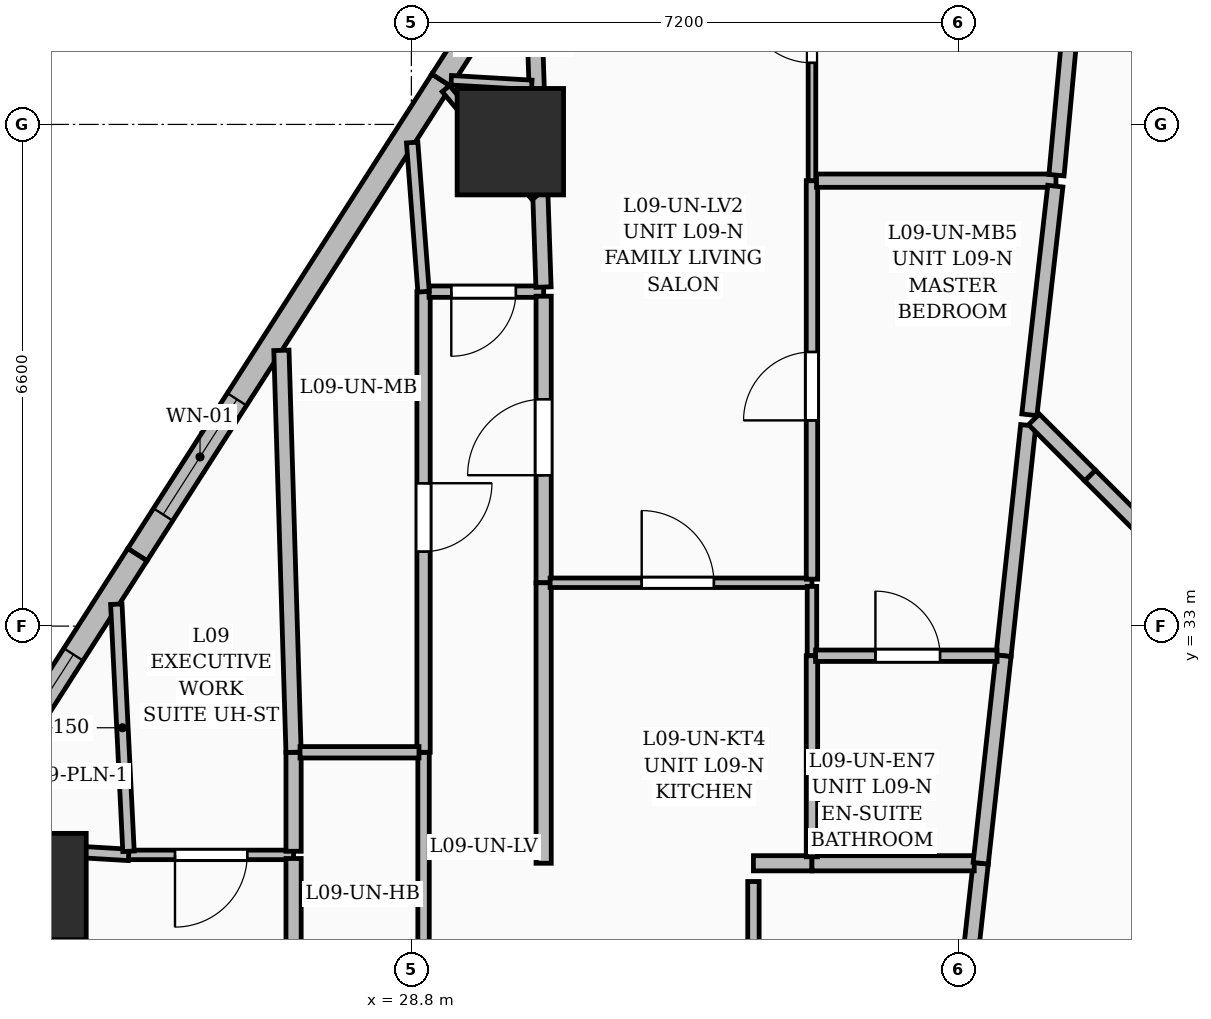
"""IFC4 building model, lengths in metres.
Left out: names, types, materials, properties, quantities, classifications, styles, units other than length and angle.
Written with IfcOpenShell. Run it as: python <this file> out.ifc"""

import sys

from ifc_helpers import new_model, si_unit, direction, frame, frame_2d, origin, origin_2d, place, context, subcontext, project, spatial, rectangle, extrude, element, fill, save


model = new_model("IFC4")
c1 = context("Model", 3, precision=1e-05, world=origin(), true_north=direction((0.0, 1.0)))
c2 = subcontext(c1, "Body", "Model", "MODEL_VIEW")
j1 = project(units=[si_unit("LENGTHUNIT", "METRE"), si_unit("PLANEANGLEUNIT", "RADIAN")], contexts=[c1])
p1 = place(None, origin())
s1 = spatial("IfcSite", under=j1, at=p1, CompositionType="ELEMENT")
p2 = place(p1, origin())
s2 = spatial("IfcBuilding", under=s1, at=p2, CompositionType="ELEMENT")
p3 = place(p2, frame((0.0, 0.0, 42.6)))
s3 = spatial("IfcBuildingStorey", under=s2, at=p3, CompositionType="ELEMENT", Elevation=42.6)
for number, where, z_axis, x_axis in (
    (1, (30.102, 39.373, 0.0), (0.0, 0.0, 1.0), (1.0, 0.0, 0.0)),
    (2, (23.822, 29.573, 0.0), (0.0, 0.0, 1.0), (1.0, 0.0, 0.0)),
):
    element("IfcColumn", number, at=place(p3, frame(where, z_axis=z_axis, x_axis=x_axis)), inside=s3, PredefinedType="COLUMN", context=c2, shape_type="SweptSolid", body=[
        extrude(rectangle(XDim=1.4, YDim=1.4, at=origin_2d()), origin(), (0.0, 0.0, 1.0), 3.6),
    ])
p4 = place(p3, frame((21.198, 27.701, 0.0), z_axis=(0.0, 0.0, 1.0), x_axis=(0.539535005594, 0.841963168873, 0.0)))
e3 = element("IfcWall", 3, at=p4, inside=s3, PredefinedType="SOLIDWALL", context=c2, shape_type="SweptSolid", body=[
    extrude(rectangle(XDim=7.412, YDim=0.3, at=frame_2d((3.706, 0.0))), origin(), (0.0, 0.0, 1.0), 3.35),
])
p5 = place(p4, frame((0.675, 0.0, 0.8)))
e4 = element("IfcOpeningElement", 4, at=p5, cuts=e3, PredefinedType="OPENING", context=c2, shape_type="SweptSolid", body=[
    extrude(rectangle(XDim=1.2, YDim=1.8, at=frame_2d((0.6, 0.9))), frame((0.0, 0.16, 0.0), z_axis=(0.0, -1.0, 0.0), x_axis=(1.0, 0.0, 0.0)), (0.0, 0.0, 1.0), 0.32),
])
p6 = place(p4, frame((3.45, 0.0, 0.6)))
e5 = element("IfcOpeningElement", 5, at=p6, cuts=e3, PredefinedType="OPENING", context=c2, shape_type="SweptSolid", body=[
    extrude(rectangle(XDim=2.4, YDim=2.1, at=frame_2d((1.2, 1.05))), frame((0.0, 0.16, 0.0), z_axis=(0.0, -1.0, 0.0), x_axis=(1.0, 0.0, 0.0)), (0.0, 0.0, 1.0), 0.32),
])
p7 = place(p3, frame((25.197, 33.941, 0.0), z_axis=(0.0, 0.0, 1.0), x_axis=(0.539535005594, 0.841963168873, 0.0)))
e6 = element("IfcWall", 6, at=p7, inside=s3, PredefinedType="SOLIDWALL", context=c2, shape_type="SweptSolid", body=[
    extrude(rectangle(XDim=7.412, YDim=0.3, at=frame_2d((3.706, 0.0))), origin(), (0.0, 0.0, 1.0), 3.35),
])
p8 = place(p7, frame((0.625, 0.0, 0.6)))
e7 = element("IfcOpeningElement", 7, at=p8, cuts=e6, PredefinedType="OPENING", context=c2, shape_type="SweptSolid", body=[
    extrude(rectangle(XDim=1.8, YDim=2.1, at=frame_2d((0.9, 1.05))), frame((0.0, 0.16, 0.0), z_axis=(0.0, -1.0, 0.0), x_axis=(1.0, 0.0, 0.0)), (0.0, 0.0, 1.0), 0.32),
])
p9 = place(p3, frame((29.195, 40.182, 0.0), z_axis=(0.0, 0.0, 1.0), x_axis=(0.539520042018, 0.841972757434, 0.0)))
e8 = element("IfcWall", 8, at=p9, inside=s3, PredefinedType="SOLIDWALL", context=c2, shape_type="SweptSolid", body=[
    extrude(rectangle(XDim=7.412, YDim=0.3, at=frame_2d((3.706, 0.0))), origin(), (0.0, 0.0, 1.0), 3.35),
])
p10 = place(p9, frame((3.875, 0.0, 0.6)))
e9 = element("IfcOpeningElement", 9, at=p10, cuts=e8, PredefinedType="OPENING", context=c2, shape_type="SweptSolid", body=[
    extrude(rectangle(XDim=1.8, YDim=2.1, at=frame_2d((0.9, 1.05))), frame((0.0, 0.16, 0.0), z_axis=(0.0, -1.0, 0.0), x_axis=(1.0, 0.0, 0.0)), (0.0, 0.0, 1.0), 0.32),
])
p11 = place(p3, frame((24.319, 17.834, 0.0), z_axis=(0.0, 0.0, 1.0), x_axis=(-0.131322881858, 0.991339649515, 0.0)))
e10 = element("IfcWall", 10, at=p11, inside=s3, PredefinedType="PARTITIONING", context=c2, shape_type="SweptSolid", body=[
    extrude(rectangle(XDim=12.116, YDim=0.2, at=frame_2d((6.058, 0.0))), origin(), (0.0, 0.0, 1.0), 2.37),
])
p12 = place(p3, frame((27.25, 29.99, 0.0), z_axis=(0.0, 0.0, 1.0), x_axis=(-1.0, 0.0, 0.0)))
e11 = element("IfcWall", 11, at=p12, inside=s3, PredefinedType="PARTITIONING", context=c2, shape_type="SweptSolid", body=[
    extrude(rectangle(XDim=2.17, YDim=0.125, at=frame_2d((1.085, 0.0))), origin(), (0.0, 0.0, 1.0), 3.35),
])
p13 = place(p12, frame((0.61, 0.0, 0.0)))
e12 = element("IfcOpeningElement", 12, at=p13, cuts=e11, PredefinedType="OPENING", context=c2, shape_type="SweptSolid", body=[
    extrude(rectangle(XDim=0.95, YDim=2.2, at=frame_2d((0.475, 1.1))), frame((0.0, 0.072, 0.0), z_axis=(0.0, -1.0, 0.0), x_axis=(1.0, 0.0, 0.0)), (0.0, 0.0, 1.0), 0.145),
])
p14 = place(p3, frame((25.08, 29.99, 0.0), z_axis=(0.0, 0.0, 1.0), x_axis=(-0.998242794365, 0.059256421583, 0.0)))
e13 = element("IfcWall", 13, at=p14, inside=s3, PredefinedType="PARTITIONING", context=c2, shape_type="SweptSolid", body=[
    extrude(rectangle(XDim=2.196, YDim=0.15, at=frame_2d((1.098, 0.0))), origin(), (0.0, 0.0, 1.0), 2.37),
])
p15 = place(p3, frame((27.25, 24.55, 0.0), z_axis=(0.0, 0.0, 1.0), x_axis=(0.0, 1.0, 0.0)))
e14 = element("IfcWall", 14, at=p15, inside=s3, PredefinedType="PARTITIONING", context=c2, shape_type="SweptSolid", body=[
    extrude(rectangle(XDim=5.392, YDim=0.2, at=frame_2d((2.696, 0.0))), origin(), (0.0, 0.0, 1.0), 2.279),
])
p16 = place(p3, frame((24.918, 33.288, 0.0), z_axis=(0.0, 0.0, 1.0), x_axis=(0.04928658055, -0.998784677985, 0.0)))
e15 = element("IfcWall", 15, at=p16, inside=s3, PredefinedType="PARTITIONING", context=c2, shape_type="SweptSolid", body=[
    extrude(rectangle(XDim=3.254, YDim=0.15, at=frame_2d((1.627, 0.0))), origin(), (0.0, 0.0, 1.0), 2.37),
])
p17 = place(p3, frame((27.25, 30.038, 0.0), z_axis=(0.0, 0.0, 1.0), x_axis=(0.0, 1.0, 0.0)))
e16 = element("IfcWall", 16, at=p17, inside=s3, PredefinedType="PARTITIONING", context=c2, shape_type="SweptSolid", body=[
    extrude(rectangle(XDim=1.302, YDim=0.2, at=frame_2d((0.651, 0.0))), origin(), (0.0, 0.0, 1.0), 3.35),
])
p18 = place(p3, frame((27.25, 31.34, 0.0), z_axis=(0.0, 0.0, 1.0), x_axis=(-0.030227650921, 0.999543040154, 0.0)))
e17 = element("IfcWall", 17, at=p18, inside=s3, PredefinedType="PARTITIONING", context=c2, shape_type="SweptSolid", body=[
    extrude(rectangle(XDim=5.29, YDim=0.2, at=frame_2d((2.645, 0.0))), origin(), (0.0, 0.0, 1.0), 2.37),
])
p19 = place(p3, frame((34.959, 17.834, 0.0), z_axis=(0.0, 0.0, 1.0), x_axis=(0.109814601961, 0.993952087978, 0.0)))
e18 = element("IfcWall", 18, at=p19, inside=s3, PredefinedType="PARTITIONING", context=c2, shape_type="SweptSolid", body=[
    extrude(rectangle(XDim=12.119, YDim=0.2, at=frame_2d((6.059, 0.0))), origin(), (0.0, 0.0, 1.0), 2.279),
])
p20 = place(p3, frame((34.07, 29.88, 0.0), z_axis=(0.0, 0.0, 1.0), x_axis=(-1.0, 0.0, 0.0)))
e19 = element("IfcWall", 19, at=p20, inside=s3, PredefinedType="PARTITIONING", context=c2, shape_type="SweptSolid", body=[
    extrude(rectangle(XDim=0.77, YDim=0.2, at=frame_2d((0.385, 0.0))), origin(), (0.0, 0.0, 1.0), 3.35),
])
p21 = place(p3, frame((36.205, 29.88, 0.0), z_axis=(0.0, 0.0, 1.0), x_axis=(-1.0, 0.0, 0.0)))
e20 = element("IfcWall", 20, at=p21, inside=s3, PredefinedType="PARTITIONING", context=c2, shape_type="SweptSolid", body=[
    extrude(rectangle(XDim=2.135, YDim=0.2, at=frame_2d((1.067, 0.0))), origin(), (0.0, 0.0, 1.0), 2.279),
])
p22 = place(p3, frame((36.915, 35.641, 0.0), z_axis=(0.0, 0.0, 1.0), x_axis=(-0.106606653323, -0.994301272989, 0.0)))
e21 = element("IfcWall", 21, at=p22, inside=s3, PredefinedType="PARTITIONING", context=c2, shape_type="SweptSolid", body=[
    extrude(rectangle(XDim=3.048, YDim=0.2, at=frame_2d((1.524, 0.0))), origin(), (0.0, 0.0, 1.0), 2.787),
])
p23 = place(p3, frame((36.59, 32.61, 0.0), z_axis=(0.0, 0.0, 1.0), x_axis=(-0.109241237924, -0.994015267457, 0.0)))
e22 = element("IfcWall", 22, at=p23, inside=s3, PredefinedType="PARTITIONING", context=c2, shape_type="SweptSolid", body=[
    extrude(rectangle(XDim=2.747, YDim=0.2, at=frame_2d((1.373, 0.0))), origin(), (0.0, 0.0, 1.0), 2.787),
])
p24 = place(p3, frame((37.73, 34.98, 0.0), z_axis=(0.0, 0.0, 1.0), x_axis=(-0.707106781187, 0.707106781187, 0.0)))
e23 = element("IfcWall", 23, at=p24, inside=s3, PredefinedType="PARTITIONING", context=c2, shape_type="SweptSolid", body=[
    extrude(rectangle(XDim=1.046, YDim=0.2, at=frame_2d((0.523, 0.0))), origin(), (0.0, 0.0, 1.0), 2.787),
])
p25 = place(p3, frame((40.99, 31.72, 0.0), z_axis=(0.0, 0.0, 1.0), x_axis=(-0.707106781187, 0.707106781187, 0.0)))
e24 = element("IfcWall", 24, at=p25, inside=s3, PredefinedType="PARTITIONING", context=c2, shape_type="SweptSolid", body=[
    extrude(rectangle(XDim=4.61, YDim=0.2, at=frame_2d((2.305, 0.0))), origin(), (0.0, 0.0, 1.0), 2.787),
])
p26 = place(p3, frame((28.96, 31.34, 0.0), z_axis=(0.0, 0.0, 1.0), x_axis=(0.0, -1.0, 0.0)))
e25 = element("IfcWall", 25, at=p26, inside=s3, PredefinedType="PARTITIONING", context=c2, shape_type="SweptSolid", body=[
    extrude(rectangle(XDim=6.79, YDim=0.15, at=frame_2d((3.395, 0.0))), origin(), (0.0, 0.0, 1.0), 2.787),
])
p27 = place(p26, frame((2.97, 0.0, 0.0)))
e26 = element("IfcOpeningElement", 26, at=p27, cuts=e25, PredefinedType="OPENING", context=c2, shape_type="SweptSolid", body=[
    extrude(rectangle(XDim=0.85, YDim=2.1, at=frame_2d((0.425, 1.05))), frame((0.0, 0.085, 0.0), z_axis=(0.0, -1.0, 0.0), x_axis=(1.0, 0.0, 0.0)), (0.0, 0.0, 1.0), 0.17),
])
p28 = place(p3, frame((28.96, 37.4, 0.0), z_axis=(0.0, 0.0, 1.0), x_axis=(0.0, -1.0, 0.0)))
e27 = element("IfcWall", 27, at=p28, inside=s3, PredefinedType="PARTITIONING", context=c2, shape_type="SweptSolid", body=[
    extrude(rectangle(XDim=6.06, YDim=0.175, at=frame_2d((3.03, 0.0))), origin(), (0.0, 0.0, 1.0), 2.37),
])
p29 = place(p28, frame((2.521, 0.0, 0.0)))
e28 = element("IfcOpeningElement", 28, at=p29, cuts=e27, PredefinedType="OPENING", context=c2, shape_type="SweptSolid", body=[
    extrude(rectangle(XDim=0.9, YDim=2.15, at=frame_2d((0.45, 1.075))), frame((0.0, 0.097, 0.0), z_axis=(0.0, -1.0, 0.0), x_axis=(1.0, 0.0, 0.0)), (0.0, 0.0, 1.0), 0.195),
])
p30 = place(p3, frame((30.54, 37.4, 0.0), z_axis=(0.0, 0.0, 1.0), x_axis=(-1.0, 0.0, 0.0)))
e29 = element("IfcWall", 29, at=p30, inside=s3, PredefinedType="PARTITIONING", context=c2, shape_type="SweptSolid", body=[
    extrude(rectangle(XDim=1.508, YDim=0.15, at=frame_2d((0.754, 0.0))), origin(), (0.0, 0.0, 1.0), 2.37),
])
p31 = place(p30, frame((0.365, 0.0, 0.0)))
e30 = element("IfcOpeningElement", 30, at=p31, cuts=e29, PredefinedType="OPENING", context=c2, shape_type="SweptSolid", body=[
    extrude(rectangle(XDim=0.85, YDim=2.1, at=frame_2d((0.425, 1.05))), frame((0.0, 0.085, 0.0), z_axis=(0.0, -1.0, 0.0), x_axis=(1.0, 0.0, 0.0)), (0.0, 0.0, 1.0), 0.17),
])
p32 = place(p3, frame((30.54, 33.57, 0.0), z_axis=(0.0, 0.0, 1.0), x_axis=(0.0, 1.0, 0.0)))
e31 = element("IfcWall", 31, at=p32, inside=s3, PredefinedType="PARTITIONING", context=c2, shape_type="SweptSolid", body=[
    extrude(rectangle(XDim=3.77, YDim=0.2, at=frame_2d((1.885, 0.0))), origin(), (0.0, 0.0, 1.0), 3.35),
])
p33 = place(p32, frame((1.415, 0.0, 0.0)))
e32 = element("IfcOpeningElement", 32, at=p33, cuts=e31, PredefinedType="OPENING", context=c2, shape_type="SweptSolid", body=[
    extrude(rectangle(XDim=1.0, YDim=2.2, at=frame_2d((0.5, 1.1))), frame((0.0, 0.11, 0.0), z_axis=(0.0, -1.0, 0.0), x_axis=(1.0, 0.0, 0.0)), (0.0, 0.0, 1.0), 0.22),
])
p34 = place(p3, frame((30.54, 29.88, 0.0), z_axis=(0.0, 0.0, 1.0), x_axis=(0.0, 1.0, 0.0)))
e33 = element("IfcWall", 33, at=p34, inside=s3, PredefinedType="PARTITIONING", context=c2, shape_type="SweptSolid", body=[
    extrude(rectangle(XDim=3.69, YDim=0.2, at=frame_2d((1.845, 0.0))), origin(), (0.0, 0.0, 1.0), 2.787),
])
p35 = place(p3, frame((28.9, 31.34, 0.0), z_axis=(0.0, 0.0, 1.0), x_axis=(-1.0, 0.0, 0.0)))
e34 = element("IfcWall", 34, at=p35, inside=s3, PredefinedType="PARTITIONING", context=c2, shape_type="SweptSolid", body=[
    extrude(rectangle(XDim=1.565, YDim=0.15, at=frame_2d((0.782, 0.0))), origin(), (0.0, 0.0, 1.0), 3.35),
])
p36 = place(p3, frame((28.96, 37.4, 0.0), z_axis=(0.0, 0.0, 1.0), x_axis=(-0.076174693918, 0.997094487, 0.0)))
e35 = element("IfcWall", 35, at=p36, inside=s3, PredefinedType="PARTITIONING", context=c2, shape_type="SweptSolid", body=[
    extrude(rectangle(XDim=1.968, YDim=0.15, at=frame_2d((0.984, 0.0))), origin(), (0.0, 0.0, 1.0), 2.37),
])
p37 = place(p3, frame((30.538, 37.46, 0.0), z_axis=(0.0, 0.0, 1.0), x_axis=(-0.034231559151, 0.999413928439, 0.0)))
e36 = element("IfcWall", 36, at=p37, inside=s3, PredefinedType="PARTITIONING", context=c2, shape_type="SweptSolid", body=[
    extrude(rectangle(XDim=4.301, YDim=0.2, at=frame_2d((2.15, 0.0))), origin(), (0.0, 0.0, 1.0), 2.279),
])
p38 = place(p3, frame((30.625, 33.57, 0.0), z_axis=(0.0, 0.0, 1.0), x_axis=(1.0, 0.0, 0.0)))
e37 = element("IfcWall", 37, at=p38, inside=s3, PredefinedType="PARTITIONING", context=c2, shape_type="SweptSolid", body=[
    extrude(rectangle(XDim=3.445, YDim=0.125, at=frame_2d((1.723, 0.0))), origin(), (0.0, 0.0, 1.0), 2.279),
])
p39 = place(p38, frame((1.205, 0.0, 0.0)))
e38 = element("IfcOpeningElement", 38, at=p39, cuts=e37, PredefinedType="OPENING", context=c2, shape_type="SweptSolid", body=[
    extrude(rectangle(XDim=0.95, YDim=2.2, at=frame_2d((0.475, 1.1))), frame((0.0, 0.072, 0.0), z_axis=(0.0, -1.0, 0.0), x_axis=(1.0, 0.0, 0.0)), (0.0, 0.0, 1.0), 0.145),
])
p40 = place(p3, frame((34.07, 33.617, 0.0), z_axis=(0.0, 0.0, 1.0), x_axis=(0.0, 1.0, 0.0)))
e39 = element("IfcWall", 39, at=p40, inside=s3, PredefinedType="PARTITIONING", context=c2, shape_type="SweptSolid", body=[
    extrude(rectangle(XDim=5.243, YDim=0.15, at=frame_2d((2.621, 0.0))), origin(), (0.0, 0.0, 1.0), 2.787),
])
p41 = place(p40, frame((2.089, 0.0, 0.0)))
e40 = element("IfcOpeningElement", 40, at=p41, cuts=e39, PredefinedType="OPENING", context=c2, shape_type="SweptSolid", body=[
    extrude(rectangle(XDim=0.9, YDim=2.15, at=frame_2d((0.45, 1.075))), frame((0.0, 0.085, 0.0), z_axis=(0.0, -1.0, 0.0), x_axis=(1.0, 0.0, 0.0)), (0.0, 0.0, 1.0), 0.17),
])
p42 = place(p3, frame((34.07, 38.86, 0.0), z_axis=(0.0, 0.0, 1.0), x_axis=(0.0, 1.0, 0.0)))
e41 = element("IfcWall", 41, at=p42, inside=s3, PredefinedType="PARTITIONING", context=c2, shape_type="SweptSolid", body=[
    extrude(rectangle(XDim=3.94, YDim=0.1, at=frame_2d((1.97, 0.0))), origin(), (0.0, 0.0, 1.0), 2.37),
])
p43 = place(p42, frame((1.55, 0.0, 0.0)))
e42 = element("IfcOpeningElement", 42, at=p43, cuts=e41, PredefinedType="OPENING", context=c2, shape_type="SweptSolid", body=[
    extrude(rectangle(XDim=0.9, YDim=2.15, at=frame_2d((0.45, 1.075))), frame((0.0, 0.06, 0.0), z_axis=(0.0, -1.0, 0.0), x_axis=(1.0, 0.0, 0.0)), (0.0, 0.0, 1.0), 0.12),
])
p44 = place(p3, frame((34.07, 32.61, 0.0), z_axis=(0.0, 0.0, 1.0), x_axis=(0.0, 1.0, 0.0)))
e43 = element("IfcWall", 43, at=p44, inside=s3, PredefinedType="PARTITIONING", context=c2, shape_type="SweptSolid", body=[
    extrude(rectangle(XDim=0.912, YDim=0.125, at=frame_2d((0.456, 0.0))), origin(), (0.0, 0.0, 1.0), 2.279),
])
p45 = place(p3, frame((34.07, 29.965, 0.0), z_axis=(0.0, 0.0, 1.0), x_axis=(0.0, 1.0, 0.0)))
e44 = element("IfcWall", 44, at=p45, inside=s3, PredefinedType="PARTITIONING", context=c2, shape_type="SweptSolid", body=[
    extrude(rectangle(XDim=2.645, YDim=0.15, at=frame_2d((1.323, 0.0))), origin(), (0.0, 0.0, 1.0), 2.279),
])
p46 = place(p3, frame((37.28, 38.86, 0.0), z_axis=(0.0, 0.0, 1.0), x_axis=(-1.0, 0.0, 0.0)))
e45 = element("IfcWall", 45, at=p46, inside=s3, PredefinedType="PARTITIONING", context=c2, shape_type="SweptSolid", body=[
    extrude(rectangle(XDim=3.15, YDim=0.175, at=frame_2d((1.575, 0.0))), origin(), (0.0, 0.0, 1.0), 3.35),
])
p47 = place(p3, frame((34.117, 32.61, 0.0), z_axis=(0.0, 0.0, 1.0), x_axis=(1.0, 0.0, 0.0)))
e46 = element("IfcWall", 46, at=p47, inside=s3, PredefinedType="PARTITIONING", context=c2, shape_type="SweptSolid", body=[
    extrude(rectangle(XDim=2.387, YDim=0.15, at=frame_2d((1.194, 0.0))), origin(), (0.0, 0.0, 1.0), 2.279),
])
p48 = place(p47, frame((0.788, 0.0, 0.0)))
e47 = element("IfcOpeningElement", 47, at=p48, cuts=e46, PredefinedType="OPENING", context=c2, shape_type="SweptSolid", body=[
    extrude(rectangle(XDim=0.85, YDim=2.1, at=frame_2d((0.425, 1.05))), frame((0.0, 0.085, 0.0), z_axis=(0.0, -1.0, 0.0), x_axis=(1.0, 0.0, 0.0)), (0.0, 0.0, 1.0), 0.17),
])
p49 = place(p3, frame((36.93, 35.78, 0.0), z_axis=(0.0, 0.0, 1.0), x_axis=(0.112900640855, 0.993606282838, 0.0)))
e48 = element("IfcWall", 48, at=p49, inside=s3, PredefinedType="PARTITIONING", context=c2, shape_type="SweptSolid", body=[
    extrude(rectangle(XDim=3.027, YDim=0.2, at=frame_2d((1.514, 0.0))), origin(), (0.0, 0.0, 1.0), 3.35),
])
p50 = place(p3, frame((37.801, 44.452, 0.0), z_axis=(0.0, 0.0, 1.0), x_axis=(-0.092703584654, -0.995693750805, 0.0)))
e49 = element("IfcWall", 49, at=p50, inside=s3, PredefinedType="PARTITIONING", context=c2, shape_type="SweptSolid", body=[
    extrude(rectangle(XDim=5.544, YDim=0.2, at=frame_2d((2.772, 0.0))), origin(), (0.0, 0.0, 1.0), 2.37),
])
p51 = place(p3, frame((33.3, 29.64, 0.0), z_axis=(0.0, 0.0, 1.0), x_axis=(0.0, -1.0, 0.0)))
e50 = element("IfcWall", 50, at=p51, inside=s3, PredefinedType="PARTITIONING", context=c2, shape_type="SweptSolid", body=[
    extrude(rectangle(XDim=2.02, YDim=0.15, at=frame_2d((1.01, 0.0))), origin(), (0.0, 0.0, 1.0), 3.35),
])
p52 = place(p3, frame((30.384, 40.12, 0.0), z_axis=(0.0, 0.0, 1.0), x_axis=(-0.998358205937, 0.057279076792, 0.0)))
e51 = element("IfcWall", 51, at=p52, inside=s3, PredefinedType="PARTITIONING", context=c2, shape_type="SweptSolid", body=[
    extrude(rectangle(XDim=1.061, YDim=0.125, at=frame_2d((0.531, 0.0))), origin(), (0.0, 0.0, 1.0), 3.35),
])
p53 = place(p3, frame((29.254, 40.071, 0.0), z_axis=(0.0, 0.0, 1.0), x_axis=(0.639548106723, -0.76875107752, 0.0)))
e52 = element("IfcWall", 52, at=p53, inside=s3, PredefinedType="PARTITIONING", context=c2, shape_type="SweptSolid", body=[
    extrude(rectangle(XDim=1.85, YDim=0.125, at=frame_2d((0.925, 0.0))), origin(), (0.0, 0.0, 1.0), 2.279),
])
p54 = place(p6, origin())
e53 = element("IfcWindow", 53, at=p54, inside=s3, PartitioningType="SINGLE_PANEL", PredefinedType="WINDOW", context=c2, shape_type="SweptSolid", body=[
    extrude(rectangle(XDim=2.4, YDim=2.1, at=frame_2d((1.2, 1.05))), frame((0.0, 0.03, 0.0), z_axis=(0.0, -1.0, 0.0), x_axis=(1.0, 0.0, 0.0)), (0.0, 0.0, 1.0), 0.06),
])
fill(e5, e53)
p55 = place(p8, origin())
e54 = element("IfcWindow", 54, at=p55, inside=s3, PartitioningType="SINGLE_PANEL", PredefinedType="WINDOW", context=c2, shape_type="SweptSolid", body=[
    extrude(rectangle(XDim=1.8, YDim=2.1, at=frame_2d((0.9, 1.05))), frame((0.0, 0.03, 0.0), z_axis=(0.0, -1.0, 0.0), x_axis=(1.0, 0.0, 0.0)), (0.0, 0.0, 1.0), 0.06),
])
fill(e7, e54)
p56 = place(p13, origin())
e55 = element("IfcDoor", 55, at=p56, inside=s3, OperationType="SINGLE_SWING_RIGHT", PredefinedType="DOOR", context=c2, shape_type="SweptSolid", body=[
    extrude(rectangle(XDim=0.95, YDim=2.2, at=frame_2d((0.475, 1.1))), frame((0.0, 0.025, 0.0), z_axis=(0.0, -1.0, 0.0), x_axis=(1.0, 0.0, 0.0)), (0.0, 0.0, 1.0), 0.05),
])
fill(e12, e55)
p57 = place(p29, origin())
e56 = element("IfcDoor", 56, at=p57, inside=s3, OperationType="SINGLE_SWING_LEFT", PredefinedType="DOOR", context=c2, shape_type="SweptSolid", body=[
    extrude(rectangle(XDim=0.9, YDim=2.15, at=frame_2d((0.45, 1.075))), frame((0.0, 0.025, 0.0), z_axis=(0.0, -1.0, 0.0), x_axis=(1.0, 0.0, 0.0)), (0.0, 0.0, 1.0), 0.05),
])
fill(e28, e56)
p58 = place(p31, origin())
e57 = element("IfcDoor", 57, at=p58, inside=s3, OperationType="SINGLE_SWING_RIGHT", PredefinedType="DOOR", context=c2, shape_type="SweptSolid", body=[
    extrude(rectangle(XDim=0.85, YDim=2.1, at=frame_2d((0.425, 1.05))), frame((0.0, 0.025, 0.0), z_axis=(0.0, -1.0, 0.0), x_axis=(1.0, 0.0, 0.0)), (0.0, 0.0, 1.0), 0.05),
])
fill(e30, e57)
p59 = place(p39, origin())
e58 = element("IfcDoor", 58, at=p59, inside=s3, OperationType="SINGLE_SWING_LEFT", PredefinedType="DOOR", context=c2, shape_type="SweptSolid", body=[
    extrude(rectangle(XDim=0.95, YDim=2.2, at=frame_2d((0.475, 1.1))), frame((0.0, 0.025, 0.0), z_axis=(0.0, -1.0, 0.0), x_axis=(1.0, 0.0, 0.0)), (0.0, 0.0, 1.0), 0.05),
])
fill(e38, e58)
p60 = place(p41, origin())
e59 = element("IfcDoor", 59, at=p60, inside=s3, OperationType="SINGLE_SWING_LEFT", PredefinedType="DOOR", context=c2, shape_type="SweptSolid", body=[
    extrude(rectangle(XDim=0.9, YDim=2.15, at=frame_2d((0.45, 1.075))), frame((0.0, 0.025, 0.0), z_axis=(0.0, -1.0, 0.0), x_axis=(1.0, 0.0, 0.0)), (0.0, 0.0, 1.0), 0.05),
])
fill(e40, e59)
p61 = place(p43, origin())
e60 = element("IfcDoor", 60, at=p61, inside=s3, OperationType="SINGLE_SWING_RIGHT", PredefinedType="DOOR", context=c2, shape_type="SweptSolid", body=[
    extrude(rectangle(XDim=0.9, YDim=2.15, at=frame_2d((0.45, 1.075))), frame((0.0, 0.025, 0.0), z_axis=(0.0, -1.0, 0.0), x_axis=(1.0, 0.0, 0.0)), (0.0, 0.0, 1.0), 0.05),
])
fill(e42, e60)
p62 = place(p48, origin())
e61 = element("IfcDoor", 61, at=p62, inside=s3, OperationType="SINGLE_SWING_LEFT", PredefinedType="DOOR", context=c2, shape_type="SweptSolid", body=[
    extrude(rectangle(XDim=0.85, YDim=2.1, at=frame_2d((0.425, 1.05))), frame((0.0, 0.025, 0.0), z_axis=(0.0, -1.0, 0.0), x_axis=(1.0, 0.0, 0.0)), (0.0, 0.0, 1.0), 0.05),
])
fill(e47, e61)
p63 = place(p33, origin())
e62 = element("IfcDoor", 62, at=p63, inside=s3, OperationType="SINGLE_SWING_LEFT", PredefinedType="DOOR", context=c2, shape_type="SweptSolid", body=[
    extrude(rectangle(XDim=1.0, YDim=2.2, at=frame_2d((0.5, 1.1))), frame((0.0, 0.025, 0.0), z_axis=(0.0, -1.0, 0.0), x_axis=(1.0, 0.0, 0.0)), (0.0, 0.0, 1.0), 0.05),
])
fill(e32, e62)
save(model, sys.argv[1])
